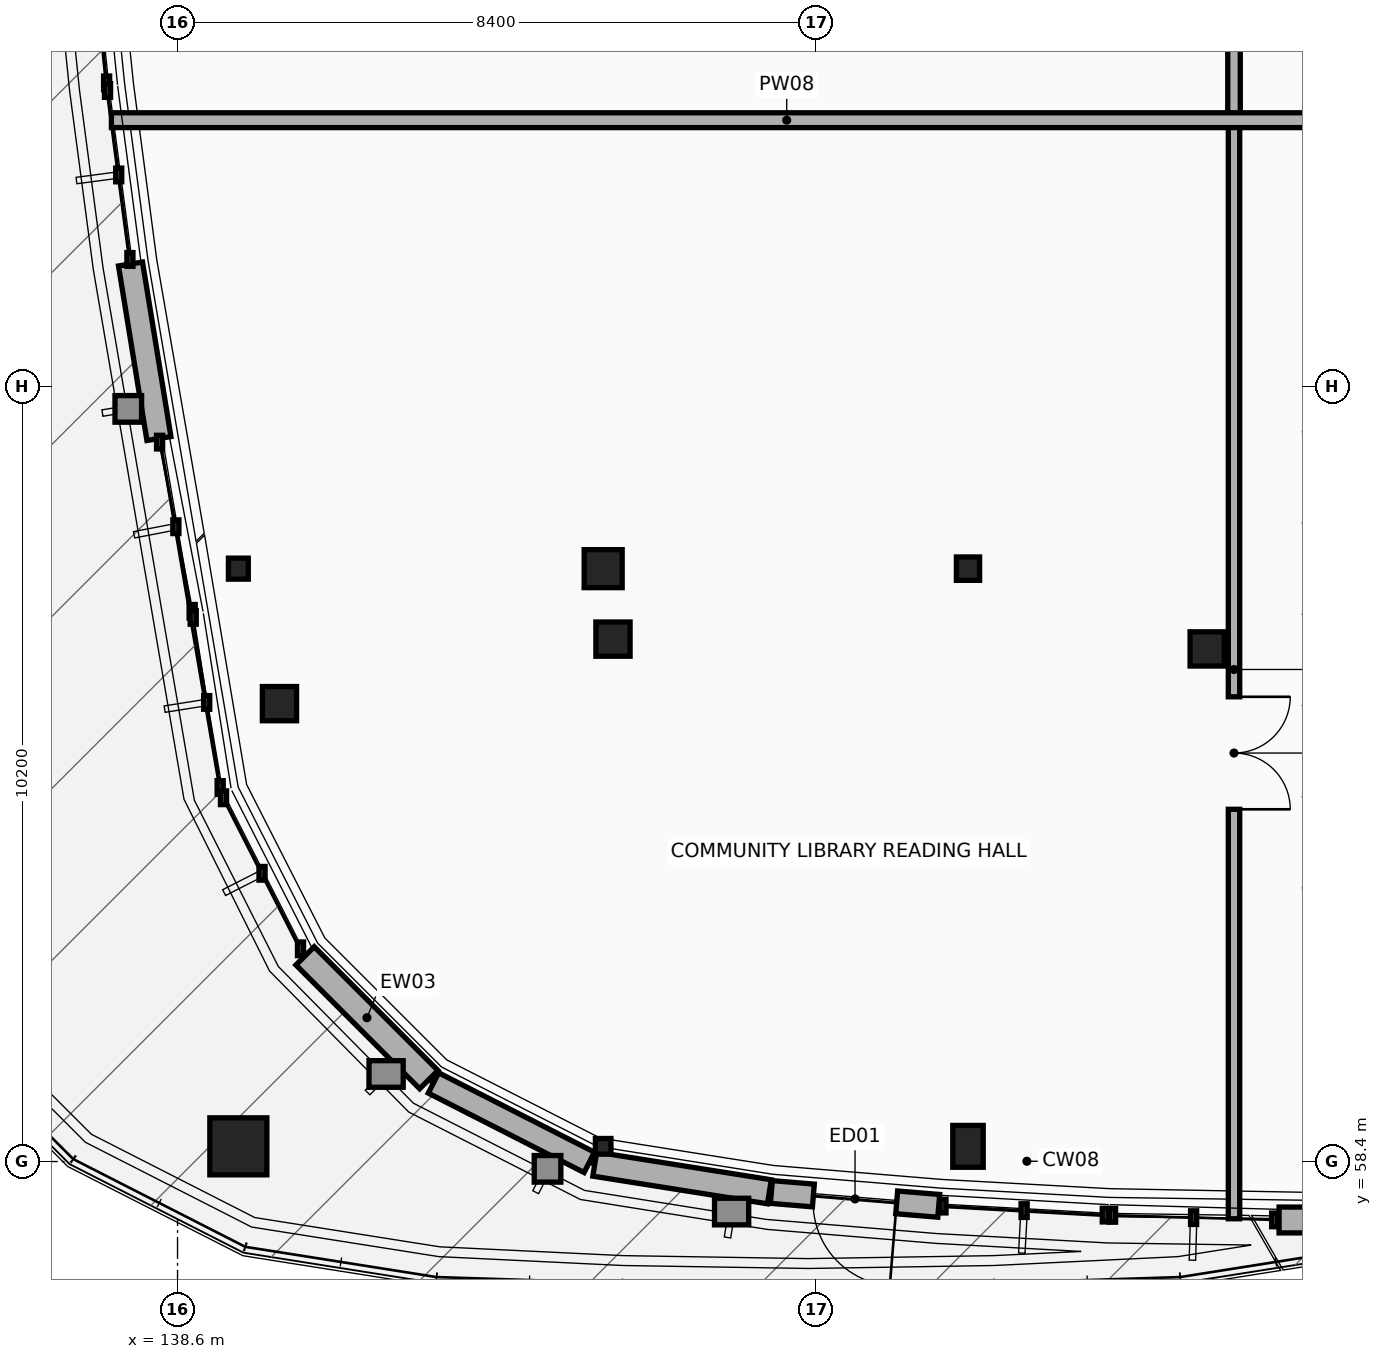
"""IFC4 building model, lengths in metres.
Left out: names, types, materials, properties, quantities, classifications, styles, units other than length and angle.
Written with IfcOpenShell. Run it as: python <this file> out.ifc"""

import sys

from ifc_helpers import new_model, si_unit, direction, frame, frame_2d, origin, origin_2d, place, context, subcontext, project, spatial, rectangle, i_section, extrude, element, fill, save


model = new_model("IFC4")
c1 = context("Model", 3, precision=1e-05, world=origin(), true_north=direction((0.0, 1.0)))
c2 = subcontext(c1, "Body", "Model", "MODEL_VIEW")
j1 = project(units=[si_unit("LENGTHUNIT", "METRE"), si_unit("PLANEANGLEUNIT", "RADIAN")], contexts=[c1])
p1 = place(None, origin())
s1 = spatial("IfcSite", under=j1, at=p1, CompositionType="ELEMENT")
p2 = place(p1, origin())
s2 = spatial("IfcBuilding", under=s1, at=p2, CompositionType="ELEMENT")
p3 = place(p2, frame((0.0, 0.0, 8.7)))
s3 = spatial("IfcBuildingStorey", under=s2, at=p3, CompositionType="ELEMENT", Elevation=8.7)
p4 = place(p3, frame((139.4, 58.6, 0.0), z_axis=(0.0, 0.0, 1.0), x_axis=(1.0, 0.0, 0.0)))
e1 = element("IfcColumn", 1, at=p4, inside=s3, PredefinedType="COLUMN", context=c2, shape_type="SweptSolid", body=[
    extrude(rectangle(XDim=0.75, YDim=0.75, at=origin_2d()), origin(), (0.0, 0.0, 1.0), 3.9),
])
p5 = place(p3, frame((139.4, 66.2, 0.0), z_axis=(0.0, 0.0, 1.0), x_axis=(1.0, 0.0, 0.0)))
e2 = element("IfcColumn", 2, at=p5, inside=s3, PredefinedType="COLUMN", context=c2, shape_type="SweptSolid", body=[
    extrude(i_section(OverallWidth=0.261, OverallDepth=0.276, WebThickness=0.015, FlangeThickness=0.025, at=origin_2d()), origin(), (0.0, 0.0, 1.0), 3.9),
])
p6 = place(p3, frame((144.2, 58.6, 0.0), z_axis=(0.0, 0.0, 1.0), x_axis=(1.0, 0.0, 0.0)))
e3 = element("IfcColumn", 3, at=p6, inside=s3, PredefinedType="COLUMN", context=c2, shape_type="SweptSolid", body=[
    extrude(i_section(OverallWidth=0.204, OverallDepth=0.206, WebThickness=0.008, FlangeThickness=0.012, at=origin_2d()), origin(), (0.0, 0.0, 1.0), 3.9),
])
p7 = place(p3, frame((144.2, 66.2, 0.0), z_axis=(0.0, 0.0, 1.0), x_axis=(1.0, 0.0, 0.0)))
e4 = element("IfcColumn", 4, at=p7, inside=s3, PredefinedType="COLUMN", context=c2, shape_type="SweptSolid", body=[
    extrude(rectangle(XDim=0.5, YDim=0.5, at=origin_2d()), origin(), (0.0, 0.0, 1.0), 3.9),
])
p8 = place(p3, frame((149.0, 58.6, 0.0), z_axis=(0.0, 0.0, 1.0), x_axis=(1.0, 0.0, 0.0)))
e5 = element("IfcColumn", 5, at=p8, inside=s3, PredefinedType="COLUMN", context=c2, shape_type="SweptSolid", body=[
    extrude(rectangle(XDim=0.4, YDim=0.55, at=origin_2d()), origin(), (0.0, 0.0, 1.0), 3.9),
])
p9 = place(p3, frame((149.0, 66.2, 0.0), z_axis=(0.0, 0.0, 1.0), x_axis=(1.0, 0.0, 0.0)))
e6 = element("IfcColumn", 6, at=p9, inside=s3, PredefinedType="COLUMN", context=c2, shape_type="SweptSolid", body=[
    extrude(i_section(OverallWidth=0.305, OverallDepth=0.308, WebThickness=0.01, FlangeThickness=0.015, at=origin_2d()), origin(), (0.0, 0.0, 1.0), 3.9),
])
p10 = place(p3, frame((139.941, 64.424, 0.0), z_axis=(0.0, 0.0, 1.0), x_axis=(1.0, 0.0, 0.0)))
e7 = element("IfcColumn", 7, at=p10, inside=s3, PredefinedType="COLUMN", context=c2, shape_type="SweptSolid", body=[
    extrude(rectangle(XDim=0.45, YDim=0.45, at=origin_2d()), origin(), (0.0, 0.0, 1.0), 3.653),
])
for number, where, z_axis, x_axis in (
    (8, (144.329, 65.273, 0.0), (0.0, 0.0, 1.0), (1.0, 0.0, 0.0)),
    (9, (152.147, 65.144, 0.0), (0.0, 0.0, 1.0), (1.0, 0.0, 0.0)),
):
    element("IfcColumn", number, at=place(p3, frame(where, z_axis=z_axis, x_axis=x_axis)), inside=s3, PredefinedType="COLUMN", context=c2, shape_type="SweptSolid", body=[
        extrude(rectangle(XDim=0.45, YDim=0.45, at=origin_2d()), origin(), (0.0, 0.0, 1.0), 3.9),
    ])
p11 = place(p3, frame((148.615, 57.817, 0.0), z_axis=(0.0, 0.0, 1.0), x_axis=(-0.996596628366, 0.082432762475, 0.0)))
e10 = element("IfcWall", 10, at=p11, inside=s3, PredefinedType="STANDARD", context=c2, shape_type="SweptSolid", body=[
    extrude(rectangle(XDim=2.209, YDim=0.3, at=frame_2d((1.105, 0.0))), origin(), (0.0, 0.0, 1.0), 3.637),
])
p12 = place(p11, frame((0.555, 0.0, 0.0)))
e11 = element("IfcOpeningElement", 11, at=p12, cuts=e10, PredefinedType="OPENING", context=c2, shape_type="SweptSolid", body=[
    extrude(rectangle(XDim=1.1, YDim=2.2, at=frame_2d((0.55, 1.1))), frame((0.0, 0.16, 0.0), z_axis=(0.0, -1.0, 0.0), x_axis=(1.0, 0.0, 0.0)), (0.0, 0.0, 1.0), 0.32),
])
p13 = place(p3, frame((155.307, 57.631, 0.0), z_axis=(0.0, 0.0, 1.0), x_axis=(-1.0, 0.0, 0.0)))
e12 = element("IfcWall", 12, at=p13, inside=s3, PredefinedType="STANDARD", context=c2, shape_type="SweptSolid", body=[
    extrude(rectangle(XDim=2.214, YDim=0.34, at=frame_2d((1.107, 0.0))), origin(), (0.0, 0.0, 1.0), 3.637),
])
p14 = place(p3, frame((138.355, 67.912, 0.0), z_axis=(0.0, 0.0, 1.0), x_axis=(-0.160789734482, 0.986988683464, 0.0)))
e13 = element("IfcWall", 13, at=p14, inside=s3, PredefinedType="STANDARD", context=c2, shape_type="SweptSolid", body=[
    extrude(rectangle(XDim=2.326, YDim=0.32, at=frame_2d((1.163, 0.0))), origin(), (0.0, 0.0, 1.0), 3.637),
])
p15 = place(p3, frame((141.906, 59.478, 0.0), z_axis=(0.0, 0.0, 1.0), x_axis=(-0.707106781187, 0.707106781187, 0.0)))
e14 = element("IfcWall", 14, at=p15, inside=s3, PredefinedType="STANDARD", context=c2, shape_type="SweptSolid", body=[
    extrude(rectangle(XDim=2.302, YDim=0.34, at=frame_2d((1.151, 0.0))), origin(), (0.0, 0.0, 1.0), 3.322),
])
p16 = place(p3, frame((144.017, 58.389, 0.0), z_axis=(0.0, 0.0, 1.0), x_axis=(-0.890898570716, 0.454202308114, 0.0)))
e15 = element("IfcWall", 15, at=p16, inside=s3, PredefinedType="STANDARD", context=c2, shape_type="SweptSolid", body=[
    extrude(rectangle(XDim=2.301, YDim=0.3, at=frame_2d((1.15, 0.0))), origin(), (0.0, 0.0, 1.0), 3.269),
])
p17 = place(p3, frame((146.387, 58.002, 0.0), z_axis=(0.0, 0.0, 1.0), x_axis=(-0.987683708691, 0.156463706933, 0.0)))
e16 = element("IfcWall", 16, at=p17, inside=s3, PredefinedType="STANDARD", context=c2, shape_type="SweptSolid", body=[
    extrude(rectangle(XDim=2.326, YDim=0.32, at=frame_2d((1.163, 0.0))), origin(), (0.0, 0.0, 1.0), 3.085),
])
p18 = place(p3, frame((152.5, 72.1, 0.0), z_axis=(0.0, 0.0, 1.0), x_axis=(0.0, -1.0, 0.0)))
e17 = element("IfcWall", 17, at=p18, inside=s3, PredefinedType="PARTITIONING", context=c2, shape_type="SweptSolid", body=[
    extrude(rectangle(XDim=14.453, YDim=0.15, at=frame_2d((7.227, 0.0))), origin(), (0.0, 0.0, 1.0), 3.018),
])
p19 = place(p18, frame((7.586, 0.0, 0.0)))
e18 = element("IfcOpeningElement", 18, at=p19, cuts=e17, PredefinedType="OPENING", context=c2, shape_type="SweptSolid", body=[
    extrude(rectangle(XDim=1.48, YDim=2.22, at=frame_2d((0.74, 1.11))), frame((0.0, 0.085, 0.0), z_axis=(0.0, -1.0, 0.0), x_axis=(1.0, 0.0, 0.0)), (0.0, 0.0, 1.0), 0.17),
])
p20 = place(p3, frame((152.5, 85.1, 0.0), z_axis=(0.0, 0.0, 1.0), x_axis=(0.0, -1.0, 0.0)))
e19 = element("IfcWall", 19, at=p20, inside=s3, PredefinedType="PARTITIONING", context=c2, shape_type="SweptSolid", body=[
    extrude(rectangle(XDim=13.0, YDim=0.165, at=frame_2d((6.5, 0.0))), origin(), (0.0, 0.0, 1.0), 3.03),
])
p21 = place(p20, frame((6.03, 0.0, 0.0)))
e20 = element("IfcOpeningElement", 20, at=p21, cuts=e19, PredefinedType="OPENING", context=c2, shape_type="SweptSolid", body=[
    extrude(rectangle(XDim=0.94, YDim=2.1, at=frame_2d((0.47, 1.05))), frame((0.0, 0.093, 0.0), z_axis=(0.0, -1.0, 0.0), x_axis=(1.0, 0.0, 0.0)), (0.0, 0.0, 1.0), 0.185),
])
p22 = place(p3, frame((137.73, 72.1, 0.0), z_axis=(0.0, 0.0, 1.0), x_axis=(1.0, 0.0, 0.0)))
e21 = element("IfcWall", 21, at=p22, inside=s3, PredefinedType="PARTITIONING", context=c2, shape_type="SweptSolid", body=[
    extrude(rectangle(XDim=17.77, YDim=0.195, at=frame_2d((8.885, 0.0))), origin(), (0.0, 0.0, 1.0), 2.947),
])
p23 = place(p12, origin())
e22 = element("IfcDoor", 22, at=p23, inside=s3, OperationType="SINGLE_SWING_LEFT", PredefinedType="DOOR", context=c2, shape_type="SweptSolid", body=[
    extrude(rectangle(XDim=1.1, YDim=2.2, at=frame_2d((0.55, 1.1))), frame((0.0, 0.025, 0.0), z_axis=(0.0, -1.0, 0.0), x_axis=(1.0, 0.0, 0.0)), (0.0, 0.0, 1.0), 0.05),
])
fill(e11, e22)
p24 = place(p19, origin())
e23 = element("IfcDoor", 23, at=p24, inside=s3, OperationType="DOUBLE_DOOR_SINGLE_SWING", PredefinedType="DOOR", context=c2, shape_type="SweptSolid", body=[
    extrude(rectangle(XDim=1.48, YDim=2.22, at=frame_2d((0.74, 1.11))), frame((0.0, 0.025, 0.0), z_axis=(0.0, -1.0, 0.0), x_axis=(1.0, 0.0, 0.0)), (0.0, 0.0, 1.0), 0.05),
])
fill(e18, e23)
save(model, sys.argv[1])
